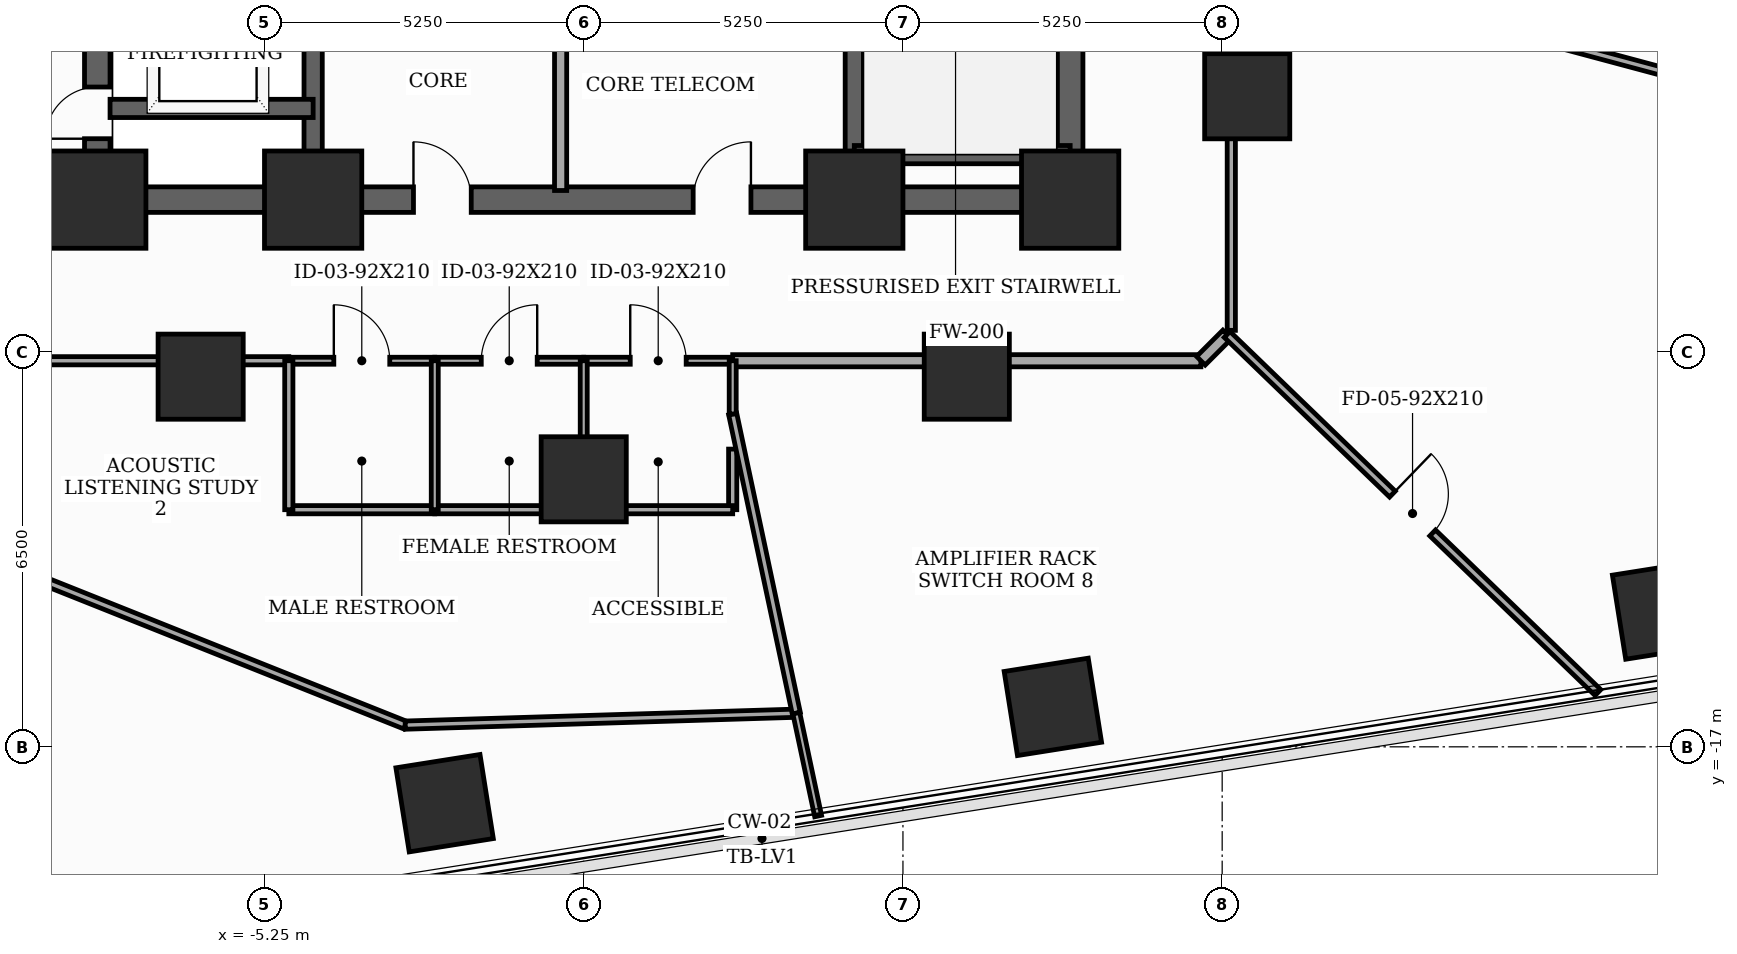
"""IFC4 building model, lengths in metres.
Left out: names, types, materials, properties, quantities, classifications, styles, units other than length and angle.
Written with IfcOpenShell. Run it as: python <this file> out.ifc"""

import sys

from ifc_helpers import new_model, si_unit, direction, frame, frame_2d, origin, origin_2d, place, context, subcontext, project, spatial, rectangle, extrude, element, fill, save


model = new_model("IFC4")
c1 = context("Model", 3, precision=1e-05, world=origin(), true_north=direction((0.0, 1.0)))
c2 = subcontext(c1, "Body", "Model", "MODEL_VIEW")
j1 = project(units=[si_unit("LENGTHUNIT", "METRE"), si_unit("PLANEANGLEUNIT", "RADIAN")], contexts=[c1])
p1 = place(None, origin())
s1 = spatial("IfcSite", under=j1, at=p1, CompositionType="ELEMENT")
p2 = place(p1, origin())
s2 = spatial("IfcBuilding", under=s1, at=p2, CompositionType="ELEMENT")
p3 = place(p2, frame((0.0, 0.0, 66.7)))
s3 = spatial("IfcBuildingStorey", under=s2, at=p3, CompositionType="ELEMENT", Elevation=66.7)
for number, where, z_axis, x_axis in (
    (1, (-8.0, -8.0, 0.0), (0.0, 0.0, 1.0), (1.0, 0.0, 0.0)),
    (2, (-4.45, -8.0, 0.0), (0.0, 0.0, 1.0), (1.0, 0.0, 0.0)),
    (3, (4.45, -8.0, 0.0), (0.0, 0.0, 1.0), (1.0, 0.0, 0.0)),
    (4, (8.0, -8.0, 0.0), (0.0, 0.0, 1.0), (1.0, 0.0, 0.0)),
):
    element("IfcColumn", number, at=place(p3, frame(where, z_axis=z_axis, x_axis=x_axis)), inside=s3, PredefinedType="COLUMN", context=c2, shape_type="SweptSolid", body=[
        extrude(rectangle(XDim=1.6, YDim=1.6, at=origin_2d()), origin(), (0.0, 0.0, 1.0), 3.7),
    ])
for number, where, z_axis, x_axis in (
    (5, (-6.3, -10.912, 0.0), (0.0, 0.0, 1.0), (1.0, 0.0, 0.0)),
    (6, (0.0, -12.6, 0.0), (0.0, 0.0, 1.0), (1.0, 0.0, 0.0)),
    (7, (6.3, -10.912, 0.0), (0.0, 0.0, 1.0), (1.0, 0.0, 0.0)),
    (8, (10.912, -6.3, 0.0), (0.0, 0.0, 1.0), (1.0, 0.0, 0.0)),
    (9, (-2.288, -17.927, 0.0), (0.0, 0.0, 1.0), (0.988, 0.156, 0.0)),
    (10, (7.716, -16.343, 0.0), (0.0, 0.0, 1.0), (0.988, 0.156, 0.0)),
    (11, (17.719, -14.758, 0.0), (0.0, 0.0, 1.0), (0.988, 0.156, 0.0)),
):
    element("IfcColumn", number, at=place(p3, frame(where, z_axis=z_axis, x_axis=x_axis)), inside=s3, PredefinedType="COLUMN", context=c2, shape_type="SweptSolid", body=[
        extrude(rectangle(XDim=1.4, YDim=1.4, at=origin_2d()), origin(), (0.0, 0.0, 1.0), 3.7),
    ])
p4 = place(p3, frame((-8.0, -8.0, 0.0), z_axis=(0.0, 0.0, 1.0), x_axis=(0.0, 1.0, 0.0)))
e12 = element("IfcWall", 12, at=p4, inside=s3, PredefinedType="SHEAR", context=c2, shape_type="SweptSolid", body=[
    extrude(rectangle(XDim=16.0, YDim=0.42, at=frame_2d((8.0, 0.0))), origin(), (0.0, 0.0, 1.0), 3.5),
])
p5 = place(p4, frame((1.002, 0.0, 0.0)))
e13 = element("IfcOpeningElement", 13, at=p5, cuts=e12, PredefinedType="OPENING", context=c2, shape_type="SweptSolid", body=[
    extrude(rectangle(XDim=0.85, YDim=2.02, at=frame_2d((0.425, 1.01))), frame((0.0, 0.22, 0.0), z_axis=(0.0, -1.0, 0.0), x_axis=(1.0, 0.0, 0.0)), (0.0, 0.0, 1.0), 0.44),
])
p6 = place(p4, frame((5.35, 0.0, 0.0)))
e14 = element("IfcOpeningElement", 14, at=p6, cuts=e12, PredefinedType="OPENING", context=c2, shape_type="SweptSolid", body=[
    extrude(rectangle(XDim=1.05, YDim=2.15, at=frame_2d((0.525, 1.075))), frame((0.0, 0.22, 0.0), z_axis=(0.0, -1.0, 0.0), x_axis=(1.0, 0.0, 0.0)), (0.0, 0.0, 1.0), 0.44),
])
p7 = place(p3, frame((8.0, -8.0, 0.0), z_axis=(0.0, 0.0, 1.0), x_axis=(0.0, 1.0, 0.0)))
e15 = element("IfcWall", 15, at=p7, inside=s3, PredefinedType="SHEAR", context=c2, shape_type="SweptSolid", body=[
    extrude(rectangle(XDim=16.0, YDim=0.42, at=frame_2d((8.0, 0.0))), origin(), (0.0, 0.0, 1.0), 3.5),
])
p8 = place(p7, frame((9.6, 0.0, 0.0)))
e16 = element("IfcOpeningElement", 16, at=p8, cuts=e15, PredefinedType="OPENING", context=c2, shape_type="SweptSolid", body=[
    extrude(rectangle(XDim=1.05, YDim=2.15, at=frame_2d((0.525, 1.075))), frame((0.0, 0.22, 0.0), z_axis=(0.0, -1.0, 0.0), x_axis=(1.0, 0.0, 0.0)), (0.0, 0.0, 1.0), 0.44),
])
p9 = place(p7, frame((14.148, 0.0, 0.0)))
e17 = element("IfcOpeningElement", 17, at=p9, cuts=e15, PredefinedType="OPENING", context=c2, shape_type="SweptSolid", body=[
    extrude(rectangle(XDim=0.85, YDim=2.02, at=frame_2d((0.425, 1.01))), frame((0.0, 0.22, 0.0), z_axis=(0.0, -1.0, 0.0), x_axis=(1.0, 0.0, 0.0)), (0.0, 0.0, 1.0), 0.44),
])
p10 = place(p3, frame((-8.0, -8.0, 0.0), z_axis=(0.0, 0.0, 1.0), x_axis=(1.0, 0.0, 0.0)))
e18 = element("IfcWall", 18, at=p10, inside=s3, PredefinedType="SHEAR", context=c2, shape_type="SweptSolid", body=[
    extrude(rectangle(XDim=16.0, YDim=0.42, at=frame_2d((8.0, 0.0))), origin(), (0.0, 0.0, 1.0), 3.5),
])
p11 = place(p10, frame((5.2, 0.0, 0.0)))
e19 = element("IfcOpeningElement", 19, at=p11, cuts=e18, PredefinedType="OPENING", context=c2, shape_type="SweptSolid", body=[
    extrude(rectangle(XDim=0.95, YDim=2.1, at=frame_2d((0.475, 1.05))), frame((0.0, 0.22, 0.0), z_axis=(0.0, -1.0, 0.0), x_axis=(1.0, 0.0, 0.0)), (0.0, 0.0, 1.0), 0.44),
])
p12 = place(p10, frame((9.8, 0.0, 0.0)))
e20 = element("IfcOpeningElement", 20, at=p12, cuts=e18, PredefinedType="OPENING", context=c2, shape_type="SweptSolid", body=[
    extrude(rectangle(XDim=0.95, YDim=2.1, at=frame_2d((0.475, 1.05))), frame((0.0, 0.22, 0.0), z_axis=(0.0, -1.0, 0.0), x_axis=(1.0, 0.0, 0.0)), (0.0, 0.0, 1.0), 0.44),
])
for number, where, z_axis, x_axis in (
    (21, (-4.45, -7.79, 0.0), (0.0, 0.0, 1.0), (0.0, 1.0, 0.0)),
    (22, (4.45, -7.79, 0.0), (0.0, 0.0, 1.0), (0.0, 1.0, 0.0)),
):
    element("IfcWall", number, at=place(p3, frame(where, z_axis=z_axis, x_axis=x_axis)), inside=s3, PredefinedType="SHEAR", context=c2, shape_type="SweptSolid", body=[
        extrude(rectangle(XDim=15.58, YDim=0.3, at=frame_2d((7.79, 0.0))), origin(), (0.0, 0.0, 1.0), 3.5),
    ])
p13 = place(p3, frame((4.45, -7.26, 0.0), z_axis=(0.0, 0.0, 1.0), x_axis=(1.0, 0.0, 0.0)))
e23 = element("IfcWall", 23, at=p13, inside=s3, PredefinedType="SHEAR", context=c2, shape_type="SweptSolid", body=[
    extrude(rectangle(XDim=3.55, YDim=0.3, at=frame_2d((1.775, 0.0))), origin(), (0.0, 0.0, 1.0), 3.5),
])
p14 = place(p3, frame((-7.79, -6.5, 0.0), z_axis=(0.0, 0.0, 1.0), x_axis=(1.0, 0.0, 0.0)))
e24 = element("IfcWall", 24, at=p14, inside=s3, PredefinedType="SHEAR", context=c2, shape_type="SweptSolid", body=[
    extrude(rectangle(XDim=3.34, YDim=0.3, at=frame_2d((1.67, 0.0))), origin(), (0.0, 0.0, 1.0), 3.5),
])
p15 = place(p3, frame((-0.38, -7.85, 0.0), z_axis=(0.0, 0.0, 1.0), x_axis=(0.0, 1.0, 0.0)))
e25 = element("IfcWall", 25, at=p15, inside=s3, PredefinedType="SOLIDWALL", context=c2, shape_type="SweptSolid", body=[
    extrude(rectangle(XDim=2.95, YDim=0.2, at=frame_2d((1.475, 0.0))), origin(), (0.0, 0.0, 1.0), 2.885),
])
p16 = place(p3, frame((10.65, -10.15, 0.0), z_axis=(0.0, 0.0, 1.0), x_axis=(0.0, 1.0, 0.0)))
e26 = element("IfcWall", 26, at=p16, inside=s3, PredefinedType="PARTITIONING", context=c2, shape_type="SweptSolid", body=[
    extrude(rectangle(XDim=6.158, YDim=0.135, at=frame_2d((3.079, 0.0))), origin(), (0.0, 0.0, 1.0), 2.785),
])
p17 = place(p3, frame((10.65, -3.992, 0.0), z_axis=(0.0, 0.0, 1.0), x_axis=(0.965906888357, -0.258889712088, 0.0)))
e27 = element("IfcWall", 27, at=p17, inside=s3, PredefinedType="PARTITIONING", context=c2, shape_type="SweptSolid", body=[
    extrude(rectangle(XDim=11.28, YDim=0.135, at=frame_2d((5.64, 0.0))), origin(), (0.0, 0.0, 1.0), 2.785),
])
p18 = place(p3, frame((-10.15, -10.65, 0.0), z_axis=(0.0, 0.0, 1.0), x_axis=(1.0, 0.0, 0.0)))
e28 = element("IfcWall", 28, at=p18, inside=s3, PredefinedType="PARTITIONING", context=c2, shape_type="SweptSolid", body=[
    extrude(rectangle(XDim=5.3, YDim=0.135, at=frame_2d((2.65, 0.0))), origin(), (0.0, 0.0, 1.0), 2.785),
])
p19 = place(p3, frame((-4.85, -10.65, 0.0), z_axis=(0.0, 0.0, 1.0), x_axis=(1.0, 0.0, 0.0)))
e29 = element("IfcWall", 29, at=p19, inside=s3, PredefinedType="PARTITIONING", context=c2, shape_type="SweptSolid", body=[
    extrude(rectangle(XDim=2.4, YDim=0.115, at=frame_2d((1.2, 0.0))), origin(), (0.0, 0.0, 1.0), 3.5),
])
p20 = place(p19, frame((0.74, 0.0, 0.0)))
e30 = element("IfcOpeningElement", 30, at=p20, cuts=e29, PredefinedType="OPENING", context=c2, shape_type="SweptSolid", body=[
    extrude(rectangle(XDim=0.92, YDim=2.1, at=frame_2d((0.46, 1.05))), frame((0.0, 0.067, 0.0), z_axis=(0.0, -1.0, 0.0), x_axis=(1.0, 0.0, 0.0)), (0.0, 0.0, 1.0), 0.135),
])
p21 = place(p3, frame((-2.45, -10.65, 0.0), z_axis=(0.0, 0.0, 1.0), x_axis=(1.0, 0.0, 0.0)))
e31 = element("IfcWall", 31, at=p21, inside=s3, PredefinedType="PARTITIONING", context=c2, shape_type="SweptSolid", body=[
    extrude(rectangle(XDim=2.45, YDim=0.115, at=frame_2d((1.225, 0.0))), origin(), (0.0, 0.0, 1.0), 2.785),
])
p22 = place(p21, frame((0.765, 0.0, 0.0)))
e32 = element("IfcOpeningElement", 32, at=p22, cuts=e31, PredefinedType="OPENING", context=c2, shape_type="SweptSolid", body=[
    extrude(rectangle(XDim=0.92, YDim=2.1, at=frame_2d((0.46, 1.05))), frame((0.0, 0.067, 0.0), z_axis=(0.0, -1.0, 0.0), x_axis=(1.0, 0.0, 0.0)), (0.0, 0.0, 1.0), 0.135),
])
p23 = place(p3, frame((0.0, -10.65, 0.0), z_axis=(0.0, 0.0, 1.0), x_axis=(1.0, 0.0, 0.0)))
e33 = element("IfcWall", 33, at=p23, inside=s3, PredefinedType="PARTITIONING", context=c2, shape_type="SweptSolid", body=[
    extrude(rectangle(XDim=2.45, YDim=0.115, at=frame_2d((1.225, 0.0))), origin(), (0.0, 0.0, 1.0), 3.5),
])
p24 = place(p23, frame((0.765, 0.0, 0.0)))
e34 = element("IfcOpeningElement", 34, at=p24, cuts=e33, PredefinedType="OPENING", context=c2, shape_type="SweptSolid", body=[
    extrude(rectangle(XDim=0.92, YDim=2.1, at=frame_2d((0.46, 1.05))), frame((0.0, 0.067, 0.0), z_axis=(0.0, -1.0, 0.0), x_axis=(1.0, 0.0, 0.0)), (0.0, 0.0, 1.0), 0.135),
])
p25 = place(p3, frame((2.45, -10.65, 0.0), z_axis=(0.0, 0.0, 1.0), x_axis=(1.0, 0.0, 0.0)))
e35 = element("IfcWall", 35, at=p25, inside=s3, PredefinedType="SOLIDWALL", context=c2, shape_type="SweptSolid", body=[
    extrude(rectangle(XDim=7.7, YDim=0.2, at=frame_2d((3.85, 0.0))), origin(), (0.0, 0.0, 1.0), 2.785),
])
p26 = place(p3, frame((10.15, -10.65, 0.0), z_axis=(0.0, 0.0, 1.0), x_axis=(0.70730655707, 0.706906948845, 0.0)))
e36 = element("IfcWall", 36, at=p26, inside=s3, PredefinedType="SOLIDWALL", context=c2, shape_type="SweptSolid", body=[
    extrude(rectangle(XDim=0.611, YDim=0.2, at=frame_2d((0.305, 0.0))), origin(), (0.0, 0.0, 1.0), 3.5),
])
p27 = place(p3, frame((10.582, -10.218, 0.0), z_axis=(0.0, 0.0, 1.0), x_axis=(0.719282851578, -0.694717337789, 0.0)))
e37 = element("IfcWall", 37, at=p27, inside=s3, PredefinedType="PARTITIONING", context=c2, shape_type="SweptSolid", body=[
    extrude(rectangle(XDim=8.477, YDim=0.135, at=frame_2d((4.239, 0.0))), origin(), (0.0, 0.0, 1.0), 2.935),
])
p28 = place(p27, frame((3.779, 0.0, 0.0)))
e38 = element("IfcOpeningElement", 38, at=p28, cuts=e37, PredefinedType="OPENING", context=c2, shape_type="SweptSolid", body=[
    extrude(rectangle(XDim=0.92, YDim=2.1, at=frame_2d((0.46, 1.05))), frame((0.0, 0.077, 0.0), z_axis=(0.0, -1.0, 0.0), x_axis=(1.0, 0.0, 0.0)), (0.0, 0.0, 1.0), 0.155),
])
p29 = place(p3, frame((-9.328, -14.093, 0.0), z_axis=(0.0, 0.0, 1.0), x_axis=(0.928830986118, -0.370503710139, 0.0)))
e39 = element("IfcWall", 39, at=p29, inside=s3, PredefinedType="PARTITIONING", context=c2, shape_type="SweptSolid", body=[
    extrude(rectangle(XDim=6.883, YDim=0.135, at=frame_2d((3.441, 0.0))), origin(), (0.0, 0.0, 1.0), 2.785),
])
p30 = place(p3, frame((-2.935, -16.643, 0.0), z_axis=(0.0, 0.0, 1.0), x_axis=(0.999535697464, 0.030469484666, 0.0)))
e40 = element("IfcWall", 40, at=p30, inside=s3, PredefinedType="PARTITIONING", context=c2, shape_type="SweptSolid", body=[
    extrude(rectangle(XDim=6.434, YDim=0.135, at=frame_2d((3.217, 0.0))), origin(), (0.0, 0.0, 1.0), 2.785),
])
p31 = place(p3, frame((-2.45, -13.1, 0.0), z_axis=(0.0, 0.0, 1.0), x_axis=(-1.0, 0.0, 0.0)))
e41 = element("IfcWall", 41, at=p31, inside=s3, PredefinedType="PARTITIONING", context=c2, shape_type="SweptSolid", body=[
    extrude(rectangle(XDim=2.4, YDim=0.135, at=frame_2d((1.2, 0.0))), origin(), (0.0, 0.0, 1.0), 3.5),
])
p32 = place(p3, frame((-4.85, -13.1, 0.0), z_axis=(0.0, 0.0, 1.0), x_axis=(0.0, 1.0, 0.0)))
e42 = element("IfcWall", 42, at=p32, inside=s3, PredefinedType="PARTITIONING", context=c2, shape_type="SweptSolid", body=[
    extrude(rectangle(XDim=2.45, YDim=0.135, at=frame_2d((1.225, 0.0))), origin(), (0.0, 0.0, 1.0), 2.785),
])
p33 = place(p3, frame((0.0, -13.1, 0.0), z_axis=(0.0, 0.0, 1.0), x_axis=(-1.0, 0.0, 0.0)))
e43 = element("IfcWall", 43, at=p33, inside=s3, PredefinedType="PARTITIONING", context=c2, shape_type="SweptSolid", body=[
    extrude(rectangle(XDim=2.45, YDim=0.135, at=frame_2d((1.225, 0.0))), origin(), (0.0, 0.0, 1.0), 2.785),
])
p34 = place(p3, frame((2.45, -12.103, 0.0), z_axis=(0.0, 0.0, 1.0), x_axis=(0.0, -1.0, 0.0)))
e44 = element("IfcWall", 44, at=p34, inside=s3, PredefinedType="PARTITIONING", context=c2, shape_type="SweptSolid", body=[
    extrude(rectangle(XDim=0.997, YDim=0.135, at=frame_2d((0.499, 0.0))), origin(), (0.0, 0.0, 1.0), 2.785),
])
p35 = place(p3, frame((2.45, -13.1, 0.0), z_axis=(0.0, 0.0, 1.0), x_axis=(-1.0, 0.0, 0.0)))
e45 = element("IfcWall", 45, at=p35, inside=s3, PredefinedType="PARTITIONING", context=c2, shape_type="SweptSolid", body=[
    extrude(rectangle(XDim=2.45, YDim=0.135, at=frame_2d((1.225, 0.0))), origin(), (0.0, 0.0, 1.0), 2.785),
])
p36 = place(p3, frame((3.496, -16.447, 0.0), z_axis=(0.0, 0.0, 1.0), x_axis=(-0.207934783689, 0.978142691908, 0.0)))
e46 = element("IfcWall", 46, at=p36, inside=s3, PredefinedType="PARTITIONING", context=c2, shape_type="SweptSolid", body=[
    extrude(rectangle(XDim=5.031, YDim=0.135, at=frame_2d((2.516, 0.0))), origin(), (0.0, 0.0, 1.0), 2.785),
])
p37 = place(p3, frame((3.855, -18.139, 0.0), z_axis=(0.0, 0.0, 1.0), x_axis=(-0.207667958155, 0.978199375974, 0.0)))
e47 = element("IfcWall", 47, at=p37, inside=s3, PredefinedType="PARTITIONING", context=c2, shape_type="SweptSolid", body=[
    extrude(rectangle(XDim=1.729, YDim=0.115, at=frame_2d((0.865, 0.0))), origin(), (0.0, 0.0, 1.0), 2.935),
])
for number, where, z_axis, x_axis in (
    (48, (-2.45, -13.1, 0.0), (0.0, 0.0, 1.0), (0.0, 1.0, 0.0)),
    (49, (0.0, -13.1, 0.0), (0.0, 0.0, 1.0), (0.0, 1.0, 0.0)),
):
    element("IfcWall", number, at=place(p3, frame(where, z_axis=z_axis, x_axis=x_axis)), inside=s3, PredefinedType="PARTITIONING", context=c2, shape_type="SweptSolid", body=[
        extrude(rectangle(XDim=2.45, YDim=0.115, at=frame_2d((1.225, 0.0))), origin(), (0.0, 0.0, 1.0), 2.785),
    ])
p38 = place(p3, frame((2.45, -11.526, 0.0), z_axis=(0.0, 0.0, 1.0), x_axis=(0.0, 1.0, 0.0)))
e50 = element("IfcWall", 50, at=p38, inside=s3, PredefinedType="PARTITIONING", context=c2, shape_type="SweptSolid", body=[
    extrude(rectangle(XDim=0.876, YDim=0.115, at=frame_2d((0.438, 0.0))), origin(), (0.0, 0.0, 1.0), 3.5),
])
p39 = place(p5, origin())
e51 = element("IfcDoor", 51, at=p39, inside=s3, OperationType="SINGLE_SWING_LEFT", PredefinedType="TRAPDOOR", context=c2, shape_type="SweptSolid", body=[
    extrude(rectangle(XDim=0.85, YDim=2.02, at=frame_2d((0.425, 1.01))), frame((0.0, 0.025, 0.0), z_axis=(0.0, -1.0, 0.0), x_axis=(1.0, 0.0, 0.0)), (0.0, 0.0, 1.0), 0.05),
])
fill(e13, e51)
p40 = place(p11, origin())
e52 = element("IfcDoor", 52, at=p40, inside=s3, OperationType="SINGLE_SWING_LEFT", PredefinedType="DOOR", context=c2, shape_type="SweptSolid", body=[
    extrude(rectangle(XDim=0.95, YDim=2.1, at=frame_2d((0.475, 1.05))), frame((0.0, 0.025, 0.0), z_axis=(0.0, -1.0, 0.0), x_axis=(1.0, 0.0, 0.0)), (0.0, 0.0, 1.0), 0.05),
])
fill(e19, e52)
p41 = place(p12, origin())
e53 = element("IfcDoor", 53, at=p41, inside=s3, OperationType="SINGLE_SWING_RIGHT", PredefinedType="DOOR", context=c2, shape_type="SweptSolid", body=[
    extrude(rectangle(XDim=0.95, YDim=2.1, at=frame_2d((0.475, 1.05))), frame((0.0, 0.025, 0.0), z_axis=(0.0, -1.0, 0.0), x_axis=(1.0, 0.0, 0.0)), (0.0, 0.0, 1.0), 0.05),
])
fill(e20, e53)
p42 = place(p20, origin())
e54 = element("IfcDoor", 54, at=p42, inside=s3, OperationType="SINGLE_SWING_LEFT", PredefinedType="DOOR", context=c2, shape_type="SweptSolid", body=[
    extrude(rectangle(XDim=0.92, YDim=2.1, at=frame_2d((0.46, 1.05))), frame((0.0, 0.025, 0.0), z_axis=(0.0, -1.0, 0.0), x_axis=(1.0, 0.0, 0.0)), (0.0, 0.0, 1.0), 0.05),
])
fill(e30, e54)
p43 = place(p22, origin())
e55 = element("IfcDoor", 55, at=p43, inside=s3, OperationType="SINGLE_SWING_RIGHT", PredefinedType="DOOR", context=c2, shape_type="SweptSolid", body=[
    extrude(rectangle(XDim=0.92, YDim=2.1, at=frame_2d((0.46, 1.05))), frame((0.0, 0.025, 0.0), z_axis=(0.0, -1.0, 0.0), x_axis=(1.0, 0.0, 0.0)), (0.0, 0.0, 1.0), 0.05),
])
fill(e32, e55)
p44 = place(p24, origin())
e56 = element("IfcDoor", 56, at=p44, inside=s3, OperationType="SINGLE_SWING_LEFT", PredefinedType="DOOR", context=c2, shape_type="SweptSolid", body=[
    extrude(rectangle(XDim=0.92, YDim=2.1, at=frame_2d((0.46, 1.05))), frame((0.0, 0.025, 0.0), z_axis=(0.0, -1.0, 0.0), x_axis=(1.0, 0.0, 0.0)), (0.0, 0.0, 1.0), 0.05),
])
fill(e34, e56)
p45 = place(p28, origin())
e57 = element("IfcDoor", 57, at=p45, inside=s3, OperationType="SINGLE_SWING_LEFT", PredefinedType="DOOR", context=c2, shape_type="SweptSolid", body=[
    extrude(rectangle(XDim=0.92, YDim=2.1, at=frame_2d((0.46, 1.05))), frame((0.0, 0.025, 0.0), z_axis=(0.0, -1.0, 0.0), x_axis=(1.0, 0.0, 0.0)), (0.0, 0.0, 1.0), 0.05),
])
fill(e38, e57)
save(model, sys.argv[1])
